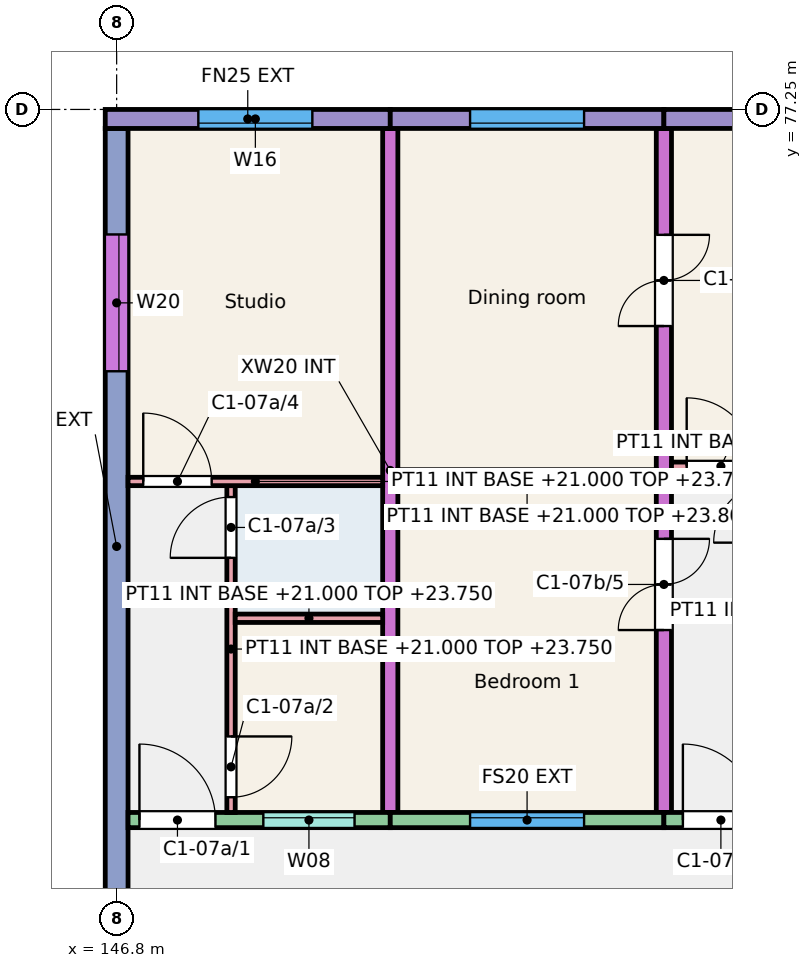
"""IFC4 building model, lengths in metres.
Left out: names, types, materials, properties, quantities, classifications, styles, units other than length and angle.
Written with IfcOpenShell. Run it as: python <this file> out.ifc"""

import sys

from ifc_helpers import new_model, si_unit, direction, frame, frame_2d, origin, place, context, subcontext, project, spatial, rectangle, extrude, element, fill, save


model = new_model("IFC4")
c1 = context("Model", 3, precision=1e-05, world=origin(), true_north=direction((0.0, 1.0)))
c2 = subcontext(c1, "Body", "Model", "MODEL_VIEW")
j1 = project(units=[si_unit("LENGTHUNIT", "METRE"), si_unit("PLANEANGLEUNIT", "RADIAN")], contexts=[c1])
p1 = place(None, origin())
s1 = spatial("IfcSite", under=j1, at=p1, CompositionType="ELEMENT")
p2 = place(p1, origin())
s2 = spatial("IfcBuilding", under=s1, at=p2, CompositionType="ELEMENT")
p3 = place(p2, frame((0.0, 0.0, 21.0)))
s3 = spatial("IfcBuildingStorey", under=s2, at=p3, CompositionType="ELEMENT", Elevation=21.0)
p4 = place(p3, frame((146.8, 66.0, 0.0), z_axis=(0.0, 0.0, 1.0), x_axis=(0.0, 1.0, 0.0)))
e1 = element("IfcWall", 1, at=p4, inside=s3, PredefinedType="SHEAR", context=c2, shape_type="SweptSolid", body=[
    extrude(rectangle(XDim=11.0, YDim=0.3, at=frame_2d((5.5, 0.0))), origin(), (0.0, 0.0, 1.0), 3.0),
])
p5 = place(p4, frame((7.805, 0.0, 0.9)))
e2 = element("IfcOpeningElement", 2, at=p5, cuts=e1, PredefinedType="OPENING", context=c2, shape_type="SweptSolid", body=[
    extrude(rectangle(XDim=1.8, YDim=1.5, at=frame_2d((0.9, 0.75))), frame((0.0, 0.16, 0.0), z_axis=(0.0, -1.0, 0.0), x_axis=(1.0, 0.0, 0.0)), (0.0, 0.0, 1.0), 0.32),
])
p6 = place(p3, frame((150.4, 68.0, 0.0), z_axis=(0.0, 0.0, 1.0), x_axis=(0.0, 1.0, 0.0)))
e3 = element("IfcWall", 3, at=p6, inside=s3, PredefinedType="SHEAR", context=c2, shape_type="SweptSolid", body=[
    extrude(rectangle(XDim=9.0, YDim=0.2, at=frame_2d((4.5, 0.0))), origin(), (0.0, 0.0, 1.0), 3.0),
])
p7 = place(p3, frame((154.0, 68.0, 0.0), z_axis=(0.0, 0.0, 1.0), x_axis=(0.0, 1.0, 0.0)))
e4 = element("IfcWall", 4, at=p7, inside=s3, PredefinedType="SHEAR", context=c2, shape_type="SweptSolid", body=[
    extrude(rectangle(XDim=9.0, YDim=0.2, at=frame_2d((4.5, 0.0))), origin(), (0.0, 0.0, 1.0), 3.0),
])
p8 = place(p7, frame((2.4, 0.0, 0.0)))
e5 = element("IfcOpeningElement", 5, at=p8, cuts=e4, PredefinedType="OPENING", context=c2, shape_type="SweptSolid", body=[
    extrude(rectangle(XDim=1.2, YDim=2.1, at=frame_2d((0.6, 1.05))), frame((0.0, 0.11, 0.0), z_axis=(0.0, -1.0, 0.0), x_axis=(1.0, 0.0, 0.0)), (0.0, 0.0, 1.0), 0.22),
])
p9 = place(p7, frame((6.4, 0.0, 0.0)))
e6 = element("IfcOpeningElement", 6, at=p9, cuts=e4, PredefinedType="OPENING", context=c2, shape_type="SweptSolid", body=[
    extrude(rectangle(XDim=1.2, YDim=2.1, at=frame_2d((0.6, 1.05))), frame((0.0, 0.11, 0.0), z_axis=(0.0, -1.0, 0.0), x_axis=(1.0, 0.0, 0.0)), (0.0, 0.0, 1.0), 0.22),
])
p10 = place(p3, frame((146.65, 77.125, 0.0), z_axis=(0.0, 0.0, 1.0), x_axis=(1.0, 0.0, 0.0)))
e7 = element("IfcWall", 7, at=p10, inside=s3, PredefinedType="SOLIDWALL", context=c2, shape_type="SweptSolid", body=[
    extrude(rectangle(XDim=3.75, YDim=0.25, at=frame_2d((1.875, 0.0))), origin(), (0.0, 0.0, 1.0), 3.0),
])
p11 = place(p10, frame((1.225, 0.0, 0.9)))
e8 = element("IfcOpeningElement", 8, at=p11, cuts=e7, PredefinedType="OPENING", context=c2, shape_type="SweptSolid", body=[
    extrude(rectangle(XDim=1.5, YDim=1.5, at=frame_2d((0.75, 0.75))), frame((0.0, 0.135, 0.0), z_axis=(0.0, -1.0, 0.0), x_axis=(1.0, 0.0, 0.0)), (0.0, 0.0, 1.0), 0.27),
])
p12 = place(p3, frame((146.95, 67.9, 0.0), z_axis=(0.0, 0.0, 1.0), x_axis=(1.0, 0.0, 0.0)))
e9 = element("IfcWall", 9, at=p12, inside=s3, PredefinedType="SOLIDWALL", context=c2, shape_type="SweptSolid", body=[
    extrude(rectangle(XDim=3.45, YDim=0.2, at=frame_2d((1.725, 0.0))), origin(), (0.0, 0.0, 1.0), 3.0),
])
p13 = place(p12, frame((1.78, 0.0, 1.1)))
e10 = element("IfcOpeningElement", 10, at=p13, cuts=e9, PredefinedType="OPENING", context=c2, shape_type="SweptSolid", body=[
    extrude(rectangle(XDim=1.2, YDim=1.3, at=frame_2d((0.6, 0.65))), frame((0.0, 0.11, 0.0), z_axis=(0.0, -1.0, 0.0), x_axis=(1.0, 0.0, 0.0)), (0.0, 0.0, 1.0), 0.22),
])
p14 = place(p12, frame((0.15, 0.0, 0.0)))
e11 = element("IfcOpeningElement", 11, at=p14, cuts=e9, PredefinedType="OPENING", context=c2, shape_type="SweptSolid", body=[
    extrude(rectangle(XDim=1.0, YDim=2.1, at=frame_2d((0.5, 1.05))), frame((0.0, 0.11, 0.0), z_axis=(0.0, -1.0, 0.0), x_axis=(1.0, 0.0, 0.0)), (0.0, 0.0, 1.0), 0.22),
])
p15 = place(p3, frame((150.4, 77.125, 0.0), z_axis=(0.0, 0.0, 1.0), x_axis=(1.0, 0.0, 0.0)))
e12 = element("IfcWall", 12, at=p15, inside=s3, PredefinedType="SOLIDWALL", context=c2, shape_type="SweptSolid", body=[
    extrude(rectangle(XDim=3.6, YDim=0.25, at=frame_2d((1.8, 0.0))), origin(), (0.0, 0.0, 1.0), 3.0),
])
p16 = place(p15, frame((1.05, 0.0, 0.9)))
e13 = element("IfcOpeningElement", 13, at=p16, cuts=e12, PredefinedType="OPENING", context=c2, shape_type="SweptSolid", body=[
    extrude(rectangle(XDim=1.5, YDim=1.5, at=frame_2d((0.75, 0.75))), frame((0.0, 0.135, 0.0), z_axis=(0.0, -1.0, 0.0), x_axis=(1.0, 0.0, 0.0)), (0.0, 0.0, 1.0), 0.27),
])
p17 = place(p3, frame((150.4, 67.9, 0.0), z_axis=(0.0, 0.0, 1.0), x_axis=(1.0, 0.0, 0.0)))
e14 = element("IfcWall", 14, at=p17, inside=s3, PredefinedType="SOLIDWALL", context=c2, shape_type="SweptSolid", body=[
    extrude(rectangle(XDim=3.6, YDim=0.2, at=frame_2d((1.8, 0.0))), origin(), (0.0, 0.0, 1.0), 3.0),
])
p18 = place(p17, frame((1.05, 0.0, 0.9)))
e15 = element("IfcOpeningElement", 15, at=p18, cuts=e14, PredefinedType="OPENING", context=c2, shape_type="SweptSolid", body=[
    extrude(rectangle(XDim=1.5, YDim=1.5, at=frame_2d((0.75, 0.75))), frame((0.0, 0.11, 0.0), z_axis=(0.0, -1.0, 0.0), x_axis=(1.0, 0.0, 0.0)), (0.0, 0.0, 1.0), 0.22),
])
p19 = place(p3, frame((154.0, 77.125, 0.0), z_axis=(0.0, 0.0, 1.0), x_axis=(1.0, 0.0, 0.0)))
e16 = element("IfcWall", 16, at=p19, inside=s3, PredefinedType="SOLIDWALL", context=c2, shape_type="SweptSolid", body=[
    extrude(rectangle(XDim=3.6, YDim=0.25, at=frame_2d((1.8, 0.0))), origin(), (0.0, 0.0, 1.0), 3.0),
])
p20 = place(p19, frame((1.038, 0.0, 0.9)))
e17 = element("IfcOpeningElement", 17, at=p20, cuts=e16, PredefinedType="OPENING", context=c2, shape_type="SweptSolid", body=[
    extrude(rectangle(XDim=1.5, YDim=1.5, at=frame_2d((0.75, 0.75))), frame((0.0, 0.135, 0.0), z_axis=(0.0, -1.0, 0.0), x_axis=(1.0, 0.0, 0.0)), (0.0, 0.0, 1.0), 0.27),
])
p21 = place(p3, frame((154.0, 67.9, 0.0), z_axis=(0.0, 0.0, 1.0), x_axis=(1.0, 0.0, 0.0)))
e18 = element("IfcWall", 18, at=p21, inside=s3, PredefinedType="SOLIDWALL", context=c2, shape_type="SweptSolid", body=[
    extrude(rectangle(XDim=3.6, YDim=0.2, at=frame_2d((1.8, 0.0))), origin(), (0.0, 0.0, 1.0), 3.0),
])
p22 = place(p21, frame((1.893, 0.0, 1.1)))
e19 = element("IfcOpeningElement", 19, at=p22, cuts=e18, PredefinedType="OPENING", context=c2, shape_type="SweptSolid", body=[
    extrude(rectangle(XDim=1.2, YDim=1.3, at=frame_2d((0.6, 0.65))), frame((0.0, 0.11, 0.0), z_axis=(0.0, -1.0, 0.0), x_axis=(1.0, 0.0, 0.0)), (0.0, 0.0, 1.0), 0.22),
])
p23 = place(p21, frame((0.25, 0.0, 0.0)))
e20 = element("IfcOpeningElement", 20, at=p23, cuts=e18, PredefinedType="OPENING", context=c2, shape_type="SweptSolid", body=[
    extrude(rectangle(XDim=1.0, YDim=2.1, at=frame_2d((0.5, 1.05))), frame((0.0, 0.11, 0.0), z_axis=(0.0, -1.0, 0.0), x_axis=(1.0, 0.0, 0.0)), (0.0, 0.0, 1.0), 0.22),
])
p24 = place(p3, frame((148.305, 68.0, 0.0), z_axis=(0.0, 0.0, 1.0), x_axis=(0.0, 1.0, 0.0)))
e21 = element("IfcWall", 21, at=p24, inside=s3, PredefinedType="PARTITIONING", context=c2, shape_type="SweptSolid", body=[
    extrude(rectangle(XDim=4.3, YDim=0.11, at=frame_2d((2.15, 0.0))), origin(), (0.0, 0.0, 1.0), 2.75),
])
p25 = place(p24, frame((0.2, 0.0, 0.0)))
e22 = element("IfcOpeningElement", 22, at=p25, cuts=e21, PredefinedType="OPENING", context=c2, shape_type="SweptSolid", body=[
    extrude(rectangle(XDim=0.8, YDim=2.1, at=frame_2d((0.4, 1.05))), frame((0.0, 0.065, 0.0), z_axis=(0.0, -1.0, 0.0), x_axis=(1.0, 0.0, 0.0)), (0.0, 0.0, 1.0), 0.13),
])
p26 = place(p24, frame((3.35, 0.0, 0.0)))
e23 = element("IfcOpeningElement", 23, at=p26, cuts=e21, PredefinedType="OPENING", context=c2, shape_type="SweptSolid", body=[
    extrude(rectangle(XDim=0.8, YDim=2.1, at=frame_2d((0.4, 1.05))), frame((0.0, 0.065, 0.0), z_axis=(0.0, -1.0, 0.0), x_axis=(1.0, 0.0, 0.0)), (0.0, 0.0, 1.0), 0.13),
])
p27 = place(p3, frame((148.36, 70.555, 0.0), z_axis=(0.0, 0.0, 1.0), x_axis=(1.0, 0.0, 0.0)))
e24 = element("IfcWall", 24, at=p27, inside=s3, PredefinedType="PARTITIONING", context=c2, shape_type="SweptSolid", body=[
    extrude(rectangle(XDim=1.94, YDim=0.11, at=frame_2d((0.97, 0.0))), origin(), (0.0, 0.0, 1.0), 2.75),
])
p28 = place(p3, frame((146.95, 72.355, 0.0), z_axis=(0.0, 0.0, 1.0), x_axis=(1.0, 0.0, 0.0)))
e25 = element("IfcWall", 25, at=p28, inside=s3, PredefinedType="PARTITIONING", context=c2, shape_type="SweptSolid", body=[
    extrude(rectangle(XDim=3.35, YDim=0.11, at=frame_2d((1.675, 0.0))), origin(), (0.0, 0.0, 1.0), 2.75),
])
p29 = place(p28, frame((0.2, 0.0, 0.0)))
e26 = element("IfcOpeningElement", 26, at=p29, cuts=e25, PredefinedType="OPENING", context=c2, shape_type="SweptSolid", body=[
    extrude(rectangle(XDim=0.9, YDim=2.1, at=frame_2d((0.45, 1.05))), frame((0.0, 0.065, 0.0), z_axis=(0.0, -1.0, 0.0), x_axis=(1.0, 0.0, 0.0)), (0.0, 0.0, 1.0), 0.13),
])
p30 = place(p3, frame((154.1, 72.555, 0.0), z_axis=(0.0, 0.0, 1.0), x_axis=(1.0, 0.0, 0.0)))
e27 = element("IfcWall", 27, at=p30, inside=s3, PredefinedType="PARTITIONING", context=c2, shape_type="SweptSolid", body=[
    extrude(rectangle(XDim=3.375, YDim=0.11, at=frame_2d((1.688, 0.0))), origin(), (0.0, 0.0, 1.0), 2.8),
])
p31 = place(p30, frame((0.2, 0.0, 0.0)))
e28 = element("IfcOpeningElement", 28, at=p31, cuts=e27, PredefinedType="OPENING", context=c2, shape_type="SweptSolid", body=[
    extrude(rectangle(XDim=0.9, YDim=2.1, at=frame_2d((0.45, 1.05))), frame((0.0, 0.065, 0.0), z_axis=(0.0, -1.0, 0.0), x_axis=(1.0, 0.0, 0.0)), (0.0, 0.0, 1.0), 0.13),
])
p32 = place(p3, frame((150.5, 72.455, 0.0), z_axis=(0.0, 0.0, 1.0), x_axis=(1.0, 0.0, 0.0)))
e29 = element("IfcWall", 29, at=p32, inside=s3, PredefinedType="PARTITIONING", context=c2, shape_type="SweptSolid", body=[
    extrude(rectangle(XDim=3.4, YDim=0.11, at=frame_2d((1.7, 0.0))), origin(), (0.0, 0.0, 1.0), 2.8),
])
p33 = place(p13, origin())
e30 = element("IfcWindow", 30, at=p33, inside=s3, PartitioningType="SINGLE_PANEL", PredefinedType="WINDOW", context=c2, shape_type="SweptSolid", body=[
    extrude(rectangle(XDim=1.2, YDim=1.3, at=frame_2d((0.6, 0.65))), frame((0.0, 0.06, 0.0), z_axis=(0.0, -1.0, 0.0), x_axis=(1.0, 0.0, 0.0)), (0.0, 0.0, 1.0), 0.06),
])
fill(e10, e30)
p34 = place(p11, origin())
e31 = element("IfcWindow", 31, at=p34, inside=s3, PartitioningType="SINGLE_PANEL", PredefinedType="WINDOW", context=c2, shape_type="SweptSolid", body=[
    extrude(rectangle(XDim=1.5, YDim=1.5, at=frame_2d((0.75, 0.75))), frame((0.0, -0.025, 0.0), z_axis=(0.0, -1.0, 0.0), x_axis=(1.0, 0.0, 0.0)), (0.0, 0.0, 1.0), 0.06),
])
fill(e8, e31)
p35 = place(p5, origin())
e32 = element("IfcWindow", 32, at=p35, inside=s3, PartitioningType="SINGLE_PANEL", PredefinedType="WINDOW", context=c2, shape_type="SweptSolid", body=[
    extrude(rectangle(XDim=1.8, YDim=1.5, at=frame_2d((0.9, 0.75))), frame((0.0, 0.0, 0.0), z_axis=(0.0, -1.0, 0.0), x_axis=(1.0, 0.0, 0.0)), (0.0, 0.0, 1.0), 0.06),
])
fill(e2, e32)
p36 = place(p18, origin())
e33 = element("IfcWindow", 33, at=p36, inside=s3, PartitioningType="SINGLE_PANEL", PredefinedType="WINDOW", context=c2, shape_type="SweptSolid", body=[
    extrude(rectangle(XDim=1.5, YDim=1.5, at=frame_2d((0.75, 0.75))), frame((0.0, 0.06, 0.0), z_axis=(0.0, -1.0, 0.0), x_axis=(1.0, 0.0, 0.0)), (0.0, 0.0, 1.0), 0.06),
])
fill(e15, e33)
p37 = place(p16, origin())
e34 = element("IfcWindow", 34, at=p37, inside=s3, PartitioningType="SINGLE_PANEL", PredefinedType="WINDOW", context=c2, shape_type="SweptSolid", body=[
    extrude(rectangle(XDim=1.5, YDim=1.5, at=frame_2d((0.75, 0.75))), frame((0.0, -0.025, 0.0), z_axis=(0.0, -1.0, 0.0), x_axis=(1.0, 0.0, 0.0)), (0.0, 0.0, 1.0), 0.06),
])
fill(e13, e34)
p38 = place(p14, origin())
e35 = element("IfcDoor", 35, at=p38, inside=s3, OperationType="SINGLE_SWING_LEFT", PredefinedType="DOOR", context=c2, shape_type="SweptSolid", body=[
    extrude(rectangle(XDim=1.0, YDim=2.1, at=frame_2d((0.5, 1.05))), frame((0.0, 0.025, 0.0), z_axis=(0.0, -1.0, 0.0), x_axis=(1.0, 0.0, 0.0)), (0.0, 0.0, 1.0), 0.05),
])
fill(e11, e35)
p39 = place(p25, origin())
e36 = element("IfcDoor", 36, at=p39, inside=s3, OperationType="SINGLE_SWING_RIGHT", PredefinedType="DOOR", context=c2, shape_type="SweptSolid", body=[
    extrude(rectangle(XDim=0.8, YDim=2.1, at=frame_2d((0.4, 1.05))), frame((0.0, 0.025, 0.0), z_axis=(0.0, -1.0, 0.0), x_axis=(1.0, 0.0, 0.0)), (0.0, 0.0, 1.0), 0.05),
])
fill(e22, e36)
p40 = place(p26, origin())
e37 = element("IfcDoor", 37, at=p40, inside=s3, OperationType="SINGLE_SWING_LEFT", PredefinedType="DOOR", context=c2, shape_type="SweptSolid", body=[
    extrude(rectangle(XDim=0.8, YDim=2.1, at=frame_2d((0.4, 1.05))), frame((0.0, 0.025, 0.0), z_axis=(0.0, -1.0, 0.0), x_axis=(1.0, 0.0, 0.0)), (0.0, 0.0, 1.0), 0.05),
])
fill(e23, e37)
p41 = place(p29, origin())
e38 = element("IfcDoor", 38, at=p41, inside=s3, OperationType="SINGLE_SWING_LEFT", PredefinedType="DOOR", context=c2, shape_type="SweptSolid", body=[
    extrude(rectangle(XDim=0.9, YDim=2.1, at=frame_2d((0.45, 1.05))), frame((0.0, 0.025, 0.0), z_axis=(0.0, -1.0, 0.0), x_axis=(1.0, 0.0, 0.0)), (0.0, 0.0, 1.0), 0.05),
])
fill(e26, e38)
p42 = place(p23, origin())
e39 = element("IfcDoor", 39, at=p42, inside=s3, OperationType="SINGLE_SWING_LEFT", PredefinedType="DOOR", context=c2, shape_type="SweptSolid", body=[
    extrude(rectangle(XDim=1.0, YDim=2.1, at=frame_2d((0.5, 1.05))), frame((0.0, 0.025, 0.0), z_axis=(0.0, -1.0, 0.0), x_axis=(1.0, 0.0, 0.0)), (0.0, 0.0, 1.0), 0.05),
])
fill(e20, e39)
p43 = place(p31, origin())
e40 = element("IfcDoor", 40, at=p43, inside=s3, OperationType="SINGLE_SWING_LEFT", PredefinedType="DOOR", context=c2, shape_type="SweptSolid", body=[
    extrude(rectangle(XDim=0.9, YDim=2.1, at=frame_2d((0.45, 1.05))), frame((0.0, 0.025, 0.0), z_axis=(0.0, -1.0, 0.0), x_axis=(1.0, 0.0, 0.0)), (0.0, 0.0, 1.0), 0.05),
])
fill(e28, e40)
p44 = place(p8, origin())
e41 = element("IfcDoor", 41, at=p44, inside=s3, OperationType="DOUBLE_DOOR_SINGLE_SWING", PredefinedType="DOOR", context=c2, shape_type="SweptSolid", body=[
    extrude(rectangle(XDim=1.2, YDim=2.1, at=frame_2d((0.6, 1.05))), frame((0.0, 0.025, 0.0), z_axis=(0.0, -1.0, 0.0), x_axis=(1.0, 0.0, 0.0)), (0.0, 0.0, 1.0), 0.05),
])
fill(e5, e41)
p45 = place(p9, origin())
e42 = element("IfcDoor", 42, at=p45, inside=s3, OperationType="DOUBLE_DOOR_SINGLE_SWING", PredefinedType="DOOR", context=c2, shape_type="SweptSolid", body=[
    extrude(rectangle(XDim=1.2, YDim=2.1, at=frame_2d((0.6, 1.05))), frame((0.0, 0.025, 0.0), z_axis=(0.0, -1.0, 0.0), x_axis=(1.0, 0.0, 0.0)), (0.0, 0.0, 1.0), 0.05),
])
fill(e6, e42)
save(model, sys.argv[1])
